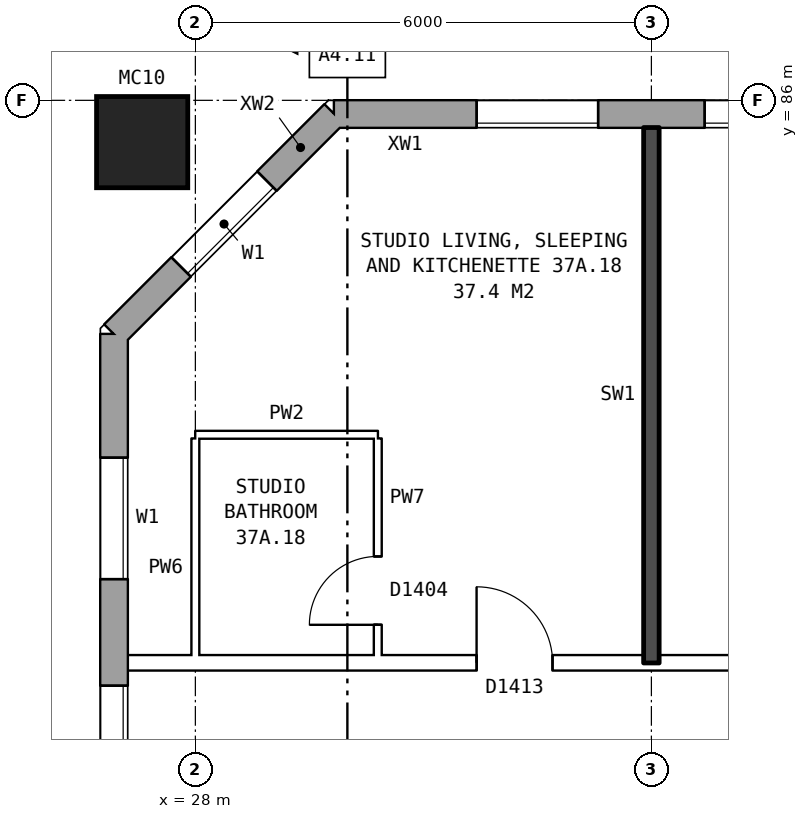
"""IFC4 building model, lengths in metres.
Left out: names, types, materials, properties, quantities, classifications, styles, units other than length and angle.
Written with IfcOpenShell. Run it as: python <this file> out.ifc"""

import sys

from ifc_helpers import new_model, si_unit, direction, frame, frame_2d, origin, origin_2d, place, context, subcontext, project, spatial, rectangle, hollow_rectangle, extrude, element, fill, save


model = new_model("IFC4")
c1 = context("Model", 3, precision=1e-05, world=origin(), true_north=direction((0.0, 1.0)))
c2 = subcontext(c1, "Body", "Model", "MODEL_VIEW")
j1 = project(units=[si_unit("LENGTHUNIT", "METRE"), si_unit("PLANEANGLEUNIT", "RADIAN")], contexts=[c1])
p1 = place(None, origin())
s1 = spatial("IfcSite", under=j1, at=p1, CompositionType="ELEMENT")
p2 = place(p1, origin())
s2 = spatial("IfcBuilding", under=s1, at=p2, CompositionType="ELEMENT")
p3 = place(p2, frame((0.0, 0.0, 133.0)))
s3 = spatial("IfcBuildingStorey", under=s2, at=p3, CompositionType="ELEMENT", Elevation=133.0)
p4 = place(p3, frame((27.3, 85.45, 0.0), z_axis=(0.0, 0.0, 1.0), x_axis=(1.0, 0.0, 0.0)))
e1 = element("IfcColumn", 1, at=p4, inside=s3, PredefinedType="COLUMN", context=c2, shape_type="SweptSolid", body=[
    extrude(hollow_rectangle(XDim=1.2, YDim=1.2, WallThickness=0.065, at=origin_2d()), origin(), (0.0, 0.0, 1.0), 3.1),
])
p5 = place(p3, frame((72.925, 85.82, 0.0), z_axis=(0.0, 0.0, 1.0), x_axis=(-1.0, 0.0, 0.0)))
e2 = element("IfcWall", 2, at=p5, inside=s3, PredefinedType="STANDARD", context=c2, shape_type="SweptSolid", body=[
    extrude(rectangle(XDim=43.101, YDim=0.36, at=frame_2d((21.55, 0.0))), origin(), (0.0, 0.0, 1.0), 2.85),
])
p6 = place(p5, frame((0.625, 0.0, 0.8)))
e3 = element("IfcOpeningElement", 3, at=p6, cuts=e2, PredefinedType="OPENING", context=c2, shape_type="SweptSolid", body=[
    extrude(rectangle(XDim=1.6, YDim=1.8, at=frame_2d((0.8, 0.9))), frame((0.0, 0.19, 0.0), z_axis=(0.0, -1.0, 0.0), x_axis=(1.0, 0.0, 0.0)), (0.0, 0.0, 1.0), 0.38),
])
p7 = place(p5, frame((3.625, 0.0, 0.8)))
e4 = element("IfcOpeningElement", 4, at=p7, cuts=e2, PredefinedType="OPENING", context=c2, shape_type="SweptSolid", body=[
    extrude(rectangle(XDim=1.6, YDim=1.8, at=frame_2d((0.8, 0.9))), frame((0.0, 0.19, 0.0), z_axis=(0.0, -1.0, 0.0), x_axis=(1.0, 0.0, 0.0)), (0.0, 0.0, 1.0), 0.38),
])
p8 = place(p5, frame((6.625, 0.0, 0.8)))
e5 = element("IfcOpeningElement", 5, at=p8, cuts=e2, PredefinedType="OPENING", context=c2, shape_type="SweptSolid", body=[
    extrude(rectangle(XDim=1.6, YDim=1.8, at=frame_2d((0.8, 0.9))), frame((0.0, 0.19, 0.0), z_axis=(0.0, -1.0, 0.0), x_axis=(1.0, 0.0, 0.0)), (0.0, 0.0, 1.0), 0.38),
])
p9 = place(p5, frame((9.625, 0.0, 0.8)))
e6 = element("IfcOpeningElement", 6, at=p9, cuts=e2, PredefinedType="OPENING", context=c2, shape_type="SweptSolid", body=[
    extrude(rectangle(XDim=1.6, YDim=1.8, at=frame_2d((0.8, 0.9))), frame((0.0, 0.19, 0.0), z_axis=(0.0, -1.0, 0.0), x_axis=(1.0, 0.0, 0.0)), (0.0, 0.0, 1.0), 0.38),
])
p10 = place(p5, frame((12.075, 0.0, 1.65)))
e7 = element("IfcOpeningElement", 7, at=p10, cuts=e2, PredefinedType="OPENING", context=c2, shape_type="SweptSolid", body=[
    extrude(rectangle(XDim=1.0, YDim=0.9, at=frame_2d((0.5, 0.45))), frame((0.0, 0.19, 0.0), z_axis=(0.0, -1.0, 0.0), x_axis=(1.0, 0.0, 0.0)), (0.0, 0.0, 1.0), 0.38),
])
p11 = place(p5, frame((15.625, 0.0, 0.8)))
e8 = element("IfcOpeningElement", 8, at=p11, cuts=e2, PredefinedType="OPENING", context=c2, shape_type="SweptSolid", body=[
    extrude(rectangle(XDim=1.6, YDim=1.8, at=frame_2d((0.8, 0.9))), frame((0.0, 0.19, 0.0), z_axis=(0.0, -1.0, 0.0), x_axis=(1.0, 0.0, 0.0)), (0.0, 0.0, 1.0), 0.38),
])
p12 = place(p5, frame((18.625, 0.0, 0.8)))
e9 = element("IfcOpeningElement", 9, at=p12, cuts=e2, PredefinedType="OPENING", context=c2, shape_type="SweptSolid", body=[
    extrude(rectangle(XDim=1.6, YDim=1.8, at=frame_2d((0.8, 0.9))), frame((0.0, 0.19, 0.0), z_axis=(0.0, -1.0, 0.0), x_axis=(1.0, 0.0, 0.0)), (0.0, 0.0, 1.0), 0.38),
])
p13 = place(p5, frame((21.625, 0.0, 0.8)))
e10 = element("IfcOpeningElement", 10, at=p13, cuts=e2, PredefinedType="OPENING", context=c2, shape_type="SweptSolid", body=[
    extrude(rectangle(XDim=1.6, YDim=1.8, at=frame_2d((0.8, 0.9))), frame((0.0, 0.19, 0.0), z_axis=(0.0, -1.0, 0.0), x_axis=(1.0, 0.0, 0.0)), (0.0, 0.0, 1.0), 0.38),
])
p14 = place(p5, frame((24.625, 0.0, 0.8)))
e11 = element("IfcOpeningElement", 11, at=p14, cuts=e2, PredefinedType="OPENING", context=c2, shape_type="SweptSolid", body=[
    extrude(rectangle(XDim=1.6, YDim=1.8, at=frame_2d((0.8, 0.9))), frame((0.0, 0.19, 0.0), z_axis=(0.0, -1.0, 0.0), x_axis=(1.0, 0.0, 0.0)), (0.0, 0.0, 1.0), 0.38),
])
p15 = place(p5, frame((27.125, 0.0, 0.8)))
e12 = element("IfcOpeningElement", 12, at=p15, cuts=e2, PredefinedType="OPENING", context=c2, shape_type="SweptSolid", body=[
    extrude(rectangle(XDim=0.6, YDim=1.8, at=frame_2d((0.3, 0.9))), frame((0.0, 0.19, 0.0), z_axis=(0.0, -1.0, 0.0), x_axis=(1.0, 0.0, 0.0)), (0.0, 0.0, 1.0), 0.38),
])
p16 = place(p5, frame((30.625, 0.0, 0.8)))
e13 = element("IfcOpeningElement", 13, at=p16, cuts=e2, PredefinedType="OPENING", context=c2, shape_type="SweptSolid", body=[
    extrude(rectangle(XDim=1.6, YDim=1.8, at=frame_2d((0.8, 0.9))), frame((0.0, 0.19, 0.0), z_axis=(0.0, -1.0, 0.0), x_axis=(1.0, 0.0, 0.0)), (0.0, 0.0, 1.0), 0.38),
])
p17 = place(p5, frame((33.625, 0.0, 0.8)))
e14 = element("IfcOpeningElement", 14, at=p17, cuts=e2, PredefinedType="OPENING", context=c2, shape_type="SweptSolid", body=[
    extrude(rectangle(XDim=1.6, YDim=1.8, at=frame_2d((0.8, 0.9))), frame((0.0, 0.19, 0.0), z_axis=(0.0, -1.0, 0.0), x_axis=(1.0, 0.0, 0.0)), (0.0, 0.0, 1.0), 0.38),
])
p18 = place(p5, frame((36.625, 0.0, 0.8)))
e15 = element("IfcOpeningElement", 15, at=p18, cuts=e2, PredefinedType="OPENING", context=c2, shape_type="SweptSolid", body=[
    extrude(rectangle(XDim=1.6, YDim=1.8, at=frame_2d((0.8, 0.9))), frame((0.0, 0.19, 0.0), z_axis=(0.0, -1.0, 0.0), x_axis=(1.0, 0.0, 0.0)), (0.0, 0.0, 1.0), 0.38),
])
p19 = place(p5, frame((39.625, 0.0, 0.8)))
e16 = element("IfcOpeningElement", 16, at=p19, cuts=e2, PredefinedType="OPENING", context=c2, shape_type="SweptSolid", body=[
    extrude(rectangle(XDim=1.6, YDim=1.8, at=frame_2d((0.8, 0.9))), frame((0.0, 0.19, 0.0), z_axis=(0.0, -1.0, 0.0), x_axis=(1.0, 0.0, 0.0)), (0.0, 0.0, 1.0), 0.38),
])
p20 = place(p5, frame((13.875, 0.0, 0.15)))
e17 = element("IfcOpeningElement", 17, at=p20, cuts=e2, PredefinedType="OPENING", context=c2, shape_type="SweptSolid", body=[
    extrude(rectangle(XDim=0.8, YDim=1.2, at=frame_2d((0.4, 0.6))), frame((0.0, 0.19, 0.0), z_axis=(0.0, -1.0, 0.0), x_axis=(1.0, 0.0, 0.0)), (0.0, 0.0, 1.0), 0.38),
])
p21 = place(p5, frame((28.025, 0.0, 0.8)))
e18 = element("IfcOpeningElement", 18, at=p21, cuts=e2, PredefinedType="OPENING", context=c2, shape_type="SweptSolid", body=[
    extrude(rectangle(XDim=0.8, YDim=0.9, at=frame_2d((0.4, 0.45))), frame((0.0, 0.19, 0.0), z_axis=(0.0, -1.0, 0.0), x_axis=(1.0, 0.0, 0.0)), (0.0, 0.0, 1.0), 0.38),
])
p22 = place(p3, frame((29.825, 85.82, 0.0), z_axis=(0.0, 0.0, 1.0), x_axis=(-0.707106781187, -0.707106781187, 0.0)))
e19 = element("IfcWall", 19, at=p22, inside=s3, PredefinedType="STANDARD", context=c2, shape_type="SweptSolid", body=[
    extrude(rectangle(XDim=4.094, YDim=0.36, at=frame_2d((2.047, 0.0))), origin(), (0.0, 0.0, 1.0), 2.85),
])
p23 = place(p22, frame((1.247, 0.0, 0.8)))
e20 = element("IfcOpeningElement", 20, at=p23, cuts=e19, PredefinedType="OPENING", context=c2, shape_type="SweptSolid", body=[
    extrude(rectangle(XDim=1.6, YDim=1.8, at=frame_2d((0.8, 0.9))), frame((0.0, 0.19, 0.0), z_axis=(0.0, -1.0, 0.0), x_axis=(1.0, 0.0, 0.0)), (0.0, 0.0, 1.0), 0.38),
])
p24 = place(p3, frame((26.93, 82.925, 0.0), z_axis=(0.0, 0.0, 1.0), x_axis=(0.0, -1.0, 0.0)))
e21 = element("IfcWall", 21, at=p24, inside=s3, PredefinedType="STANDARD", context=c2, shape_type="SweptSolid", body=[
    extrude(rectangle(XDim=25.851, YDim=0.36, at=frame_2d((12.925, 0.0))), origin(), (0.0, 0.0, 1.0), 2.85),
])
p25 = place(p24, frame((1.625, 0.0, 0.8)))
e22 = element("IfcOpeningElement", 22, at=p25, cuts=e21, PredefinedType="OPENING", context=c2, shape_type="SweptSolid", body=[
    extrude(rectangle(XDim=1.6, YDim=1.8, at=frame_2d((0.8, 0.9))), frame((0.0, 0.19, 0.0), z_axis=(0.0, -1.0, 0.0), x_axis=(1.0, 0.0, 0.0)), (0.0, 0.0, 1.0), 0.38),
])
p26 = place(p24, frame((4.625, 0.0, 0.8)))
e23 = element("IfcOpeningElement", 23, at=p26, cuts=e21, PredefinedType="OPENING", context=c2, shape_type="SweptSolid", body=[
    extrude(rectangle(XDim=1.6, YDim=1.8, at=frame_2d((0.8, 0.9))), frame((0.0, 0.19, 0.0), z_axis=(0.0, -1.0, 0.0), x_axis=(1.0, 0.0, 0.0)), (0.0, 0.0, 1.0), 0.38),
])
p27 = place(p24, frame((8.025, 0.0, 1.7)))
e24 = element("IfcOpeningElement", 24, at=p27, cuts=e21, PredefinedType="OPENING", context=c2, shape_type="SweptSolid", body=[
    extrude(rectangle(XDim=1.0, YDim=0.9, at=frame_2d((0.5, 0.45))), frame((0.0, 0.19, 0.0), z_axis=(0.0, -1.0, 0.0), x_axis=(1.0, 0.0, 0.0)), (0.0, 0.0, 1.0), 0.38),
])
p28 = place(p24, frame((10.625, 0.0, 0.8)))
e25 = element("IfcOpeningElement", 25, at=p28, cuts=e21, PredefinedType="OPENING", context=c2, shape_type="SweptSolid", body=[
    extrude(rectangle(XDim=1.6, YDim=1.8, at=frame_2d((0.8, 0.9))), frame((0.0, 0.19, 0.0), z_axis=(0.0, -1.0, 0.0), x_axis=(1.0, 0.0, 0.0)), (0.0, 0.0, 1.0), 0.38),
])
p29 = place(p24, frame((13.625, 0.0, 0.8)))
e26 = element("IfcOpeningElement", 26, at=p29, cuts=e21, PredefinedType="OPENING", context=c2, shape_type="SweptSolid", body=[
    extrude(rectangle(XDim=1.6, YDim=1.8, at=frame_2d((0.8, 0.9))), frame((0.0, 0.19, 0.0), z_axis=(0.0, -1.0, 0.0), x_axis=(1.0, 0.0, 0.0)), (0.0, 0.0, 1.0), 0.38),
])
p30 = place(p24, frame((9.325, 0.0, 0.8)))
e27 = element("IfcOpeningElement", 27, at=p30, cuts=e21, PredefinedType="OPENING", context=c2, shape_type="SweptSolid", body=[
    extrude(rectangle(XDim=1.0, YDim=1.8, at=frame_2d((0.5, 0.9))), frame((0.0, 0.19, 0.0), z_axis=(0.0, -1.0, 0.0), x_axis=(1.0, 0.0, 0.0)), (0.0, 0.0, 1.0), 0.38),
])
p31 = place(p24, frame((19.625, 0.0, 0.8)))
e28 = element("IfcOpeningElement", 28, at=p31, cuts=e21, PredefinedType="OPENING", context=c2, shape_type="SweptSolid", body=[
    extrude(rectangle(XDim=1.6, YDim=1.8, at=frame_2d((0.8, 0.9))), frame((0.0, 0.19, 0.0), z_axis=(0.0, -1.0, 0.0), x_axis=(1.0, 0.0, 0.0)), (0.0, 0.0, 1.0), 0.38),
])
p32 = place(p24, frame((22.625, 0.0, 0.8)))
e29 = element("IfcOpeningElement", 29, at=p32, cuts=e21, PredefinedType="OPENING", context=c2, shape_type="SweptSolid", body=[
    extrude(rectangle(XDim=1.6, YDim=1.8, at=frame_2d((0.8, 0.9))), frame((0.0, 0.19, 0.0), z_axis=(0.0, -1.0, 0.0), x_axis=(1.0, 0.0, 0.0)), (0.0, 0.0, 1.0), 0.38),
])
p33 = place(p24, frame((12.525, 0.0, 0.8)))
e30 = element("IfcOpeningElement", 30, at=p33, cuts=e21, PredefinedType="OPENING", context=c2, shape_type="SweptSolid", body=[
    extrude(rectangle(XDim=0.8, YDim=1.8, at=frame_2d((0.4, 0.9))), frame((0.0, 0.19, 0.0), z_axis=(0.0, -1.0, 0.0), x_axis=(1.0, 0.0, 0.0)), (0.0, 0.0, 1.0), 0.38),
])
p34 = place(p24, frame((15.525, 0.0, 0.8)))
e31 = element("IfcOpeningElement", 31, at=p34, cuts=e21, PredefinedType="OPENING", context=c2, shape_type="SweptSolid", body=[
    extrude(rectangle(XDim=1.0, YDim=1.8, at=frame_2d((0.5, 0.9))), frame((0.0, 0.19, 0.0), z_axis=(0.0, -1.0, 0.0), x_axis=(1.0, 0.0, 0.0)), (0.0, 0.0, 1.0), 0.38),
])
p35 = place(p24, frame((16.825, 0.0, 1.7)))
e32 = element("IfcOpeningElement", 32, at=p35, cuts=e21, PredefinedType="OPENING", context=c2, shape_type="SweptSolid", body=[
    extrude(rectangle(XDim=1.0, YDim=0.9, at=frame_2d((0.5, 0.45))), frame((0.0, 0.19, 0.0), z_axis=(0.0, -1.0, 0.0), x_axis=(1.0, 0.0, 0.0)), (0.0, 0.0, 1.0), 0.38),
])
p36 = place(p3, frame((27.11, 78.6, 0.0), z_axis=(0.0, 0.0, 1.0), x_axis=(1.0, 0.0, 0.0)))
e33 = element("IfcWall", 33, at=p36, inside=s3, PredefinedType="PARTITIONING", context=c2, shape_type="SweptSolid", body=[
    extrude(rectangle(XDim=18.79, YDim=0.2, at=frame_2d((9.395, 0.0))), origin(), (0.0, 0.0, 1.0), 2.85),
])
p37 = place(p36, frame((14.19, 0.0, 0.0)))
e34 = element("IfcOpeningElement", 34, at=p37, cuts=e33, PredefinedType="OPENING", context=c2, shape_type="SweptSolid", body=[
    extrude(rectangle(XDim=1.0, YDim=2.1, at=frame_2d((0.5, 1.05))), frame((0.0, 0.11, 0.0), z_axis=(0.0, -1.0, 0.0), x_axis=(1.0, 0.0, 0.0)), (0.0, 0.0, 1.0), 0.22),
])
p38 = place(p36, frame((8.19, 0.0, 0.0)))
e35 = element("IfcOpeningElement", 35, at=p38, cuts=e33, PredefinedType="OPENING", context=c2, shape_type="SweptSolid", body=[
    extrude(rectangle(XDim=1.0, YDim=2.1, at=frame_2d((0.5, 1.05))), frame((0.0, 0.11, 0.0), z_axis=(0.0, -1.0, 0.0), x_axis=(1.0, 0.0, 0.0)), (0.0, 0.0, 1.0), 0.22),
])
p39 = place(p36, frame((4.59, 0.0, 0.0)))
e36 = element("IfcOpeningElement", 36, at=p39, cuts=e33, PredefinedType="OPENING", context=c2, shape_type="SweptSolid", body=[
    extrude(rectangle(XDim=1.0, YDim=2.1, at=frame_2d((0.5, 1.05))), frame((0.0, 0.11, 0.0), z_axis=(0.0, -1.0, 0.0), x_axis=(1.0, 0.0, 0.0)), (0.0, 0.0, 1.0), 0.22),
])
p40 = place(p3, frame((28.0, 81.6, 0.0), z_axis=(0.0, 0.0, 1.0), x_axis=(1.0, 0.0, 0.0)))
e37 = element("IfcWall", 37, at=p40, inside=s3, PredefinedType="PARTITIONING", context=c2, shape_type="SweptSolid", body=[
    extrude(rectangle(XDim=2.4, YDim=0.1, at=frame_2d((1.2, 0.0))), origin(), (0.0, 0.0, 1.0), 2.85),
])
p41 = place(p3, frame((28.0, 78.7, 0.0), z_axis=(0.0, 0.0, 1.0), x_axis=(0.0, 1.0, 0.0)))
e38 = element("IfcWall", 38, at=p41, inside=s3, PredefinedType="PARTITIONING", context=c2, shape_type="SweptSolid", body=[
    extrude(rectangle(XDim=2.85, YDim=0.1, at=frame_2d((1.425, 0.0))), origin(), (0.0, 0.0, 1.0), 2.85),
])
p42 = place(p3, frame((30.4, 78.7, 0.0), z_axis=(0.0, 0.0, 1.0), x_axis=(0.0, 1.0, 0.0)))
e39 = element("IfcWall", 39, at=p42, inside=s3, PredefinedType="PARTITIONING", context=c2, shape_type="SweptSolid", body=[
    extrude(rectangle(XDim=2.85, YDim=0.1, at=frame_2d((1.425, 0.0))), origin(), (0.0, 0.0, 1.0), 2.85),
])
p43 = place(p42, frame((0.4, 0.0, 0.0)))
e40 = element("IfcOpeningElement", 40, at=p43, cuts=e39, PredefinedType="OPENING", context=c2, shape_type="SweptSolid", body=[
    extrude(rectangle(XDim=0.9, YDim=2.1, at=frame_2d((0.45, 1.05))), frame((0.0, 0.06, 0.0), z_axis=(0.0, -1.0, 0.0), x_axis=(1.0, 0.0, 0.0)), (0.0, 0.0, 1.0), 0.12),
])
p44 = place(p3, frame((34.0, 78.6, 0.0), z_axis=(0.0, 0.0, 1.0), x_axis=(0.0, 1.0, 0.0)))
e41 = element("IfcWall", 41, at=p44, inside=s3, PredefinedType="SOLIDWALL", context=c2, shape_type="SweptSolid", body=[
    extrude(rectangle(XDim=7.04, YDim=0.2, at=frame_2d((3.52, 0.0))), origin(), (0.0, 0.0, 1.0), 2.85),
])
p45 = place(p18, origin())
e42 = element("IfcWindow", 42, at=p45, inside=s3, PartitioningType="SINGLE_PANEL", PredefinedType="WINDOW", context=c2, shape_type="SweptSolid", body=[
    extrude(rectangle(XDim=1.6, YDim=1.8, at=frame_2d((0.8, 0.9))), frame((0.0, 0.15, 0.0), z_axis=(0.0, -1.0, 0.0), x_axis=(1.0, 0.0, 0.0)), (0.0, 0.0, 1.0), 0.06),
])
fill(e15, e42)
p46 = place(p19, origin())
e43 = element("IfcWindow", 43, at=p46, inside=s3, PartitioningType="SINGLE_PANEL", PredefinedType="WINDOW", context=c2, shape_type="SweptSolid", body=[
    extrude(rectangle(XDim=1.6, YDim=1.8, at=frame_2d((0.8, 0.9))), frame((0.0, 0.15, 0.0), z_axis=(0.0, -1.0, 0.0), x_axis=(1.0, 0.0, 0.0)), (0.0, 0.0, 1.0), 0.06),
])
fill(e16, e43)
p47 = place(p23, origin())
e44 = element("IfcWindow", 44, at=p47, inside=s3, PartitioningType="SINGLE_PANEL", PredefinedType="WINDOW", context=c2, shape_type="SweptSolid", body=[
    extrude(rectangle(XDim=1.6, YDim=1.8, at=frame_2d((0.8, 0.9))), frame((0.0, 0.15, 0.0), z_axis=(0.0, -1.0, 0.0), x_axis=(1.0, 0.0, 0.0)), (0.0, 0.0, 1.0), 0.06),
])
fill(e20, e44)
p48 = place(p25, origin())
e45 = element("IfcWindow", 45, at=p48, inside=s3, PartitioningType="SINGLE_PANEL", PredefinedType="WINDOW", context=c2, shape_type="SweptSolid", body=[
    extrude(rectangle(XDim=1.6, YDim=1.8, at=frame_2d((0.8, 0.9))), frame((0.0, 0.15, 0.0), z_axis=(0.0, -1.0, 0.0), x_axis=(1.0, 0.0, 0.0)), (0.0, 0.0, 1.0), 0.06),
])
fill(e22, e45)
p49 = place(p26, origin())
e46 = element("IfcWindow", 46, at=p49, inside=s3, PartitioningType="SINGLE_PANEL", PredefinedType="WINDOW", context=c2, shape_type="SweptSolid", body=[
    extrude(rectangle(XDim=1.6, YDim=1.8, at=frame_2d((0.8, 0.9))), frame((0.0, 0.15, 0.0), z_axis=(0.0, -1.0, 0.0), x_axis=(1.0, 0.0, 0.0)), (0.0, 0.0, 1.0), 0.06),
])
fill(e23, e46)
p50 = place(p39, origin())
e47 = element("IfcDoor", 47, at=p50, inside=s3, OperationType="SINGLE_SWING_LEFT", PredefinedType="DOOR", context=c2, shape_type="SweptSolid", body=[
    extrude(rectangle(XDim=1.0, YDim=2.1, at=frame_2d((0.5, 1.05))), frame((0.0, 0.025, 0.0), z_axis=(0.0, -1.0, 0.0), x_axis=(1.0, 0.0, 0.0)), (0.0, 0.0, 1.0), 0.05),
])
fill(e36, e47)
p51 = place(p43, origin())
e48 = element("IfcDoor", 48, at=p51, inside=s3, OperationType="SINGLE_SWING_LEFT", PredefinedType="DOOR", context=c2, shape_type="SweptSolid", body=[
    extrude(rectangle(XDim=0.9, YDim=2.1, at=frame_2d((0.45, 1.05))), frame((0.0, 0.025, 0.0), z_axis=(0.0, -1.0, 0.0), x_axis=(1.0, 0.0, 0.0)), (0.0, 0.0, 1.0), 0.05),
])
fill(e40, e48)
save(model, sys.argv[1])
